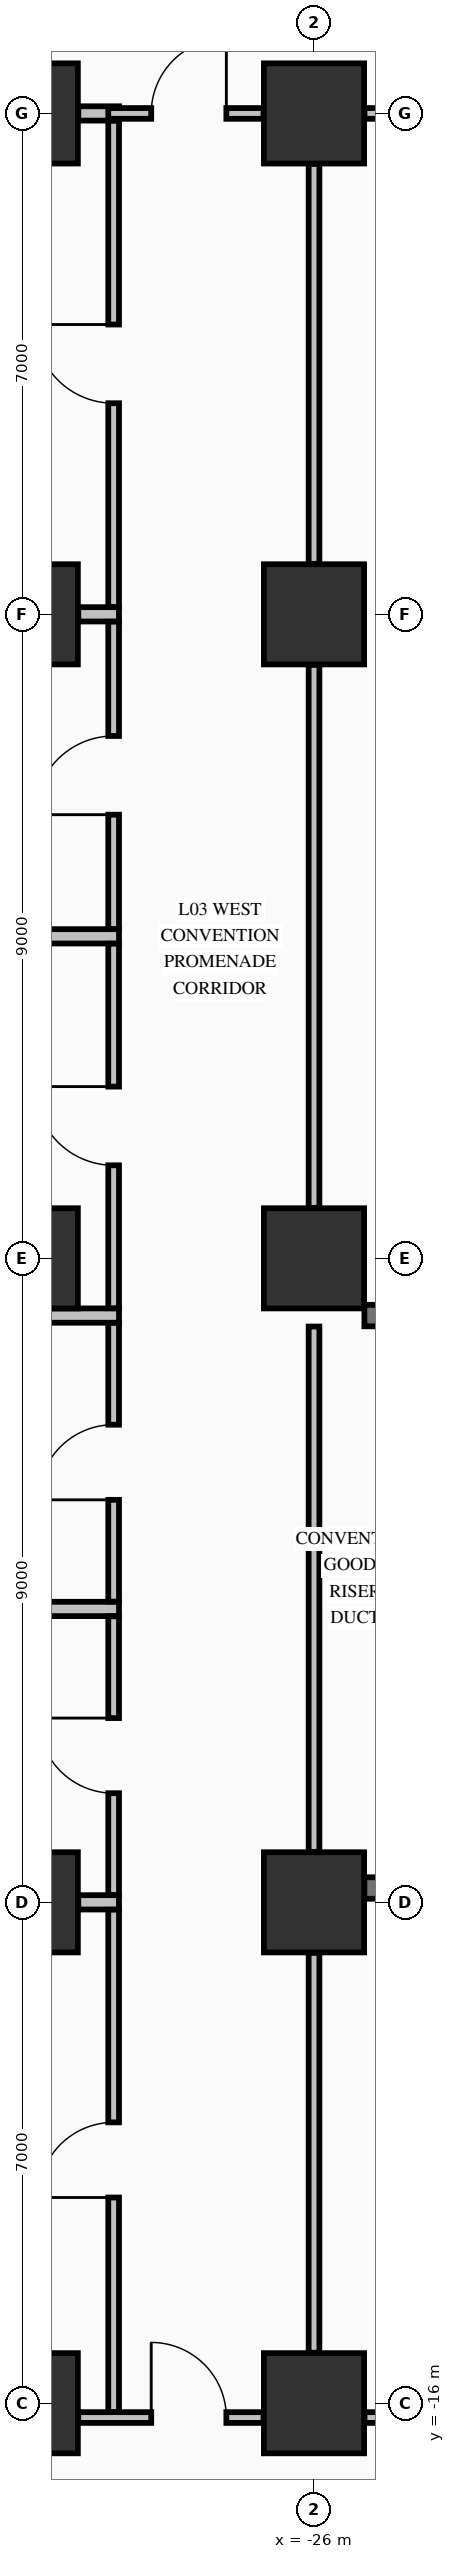
"""IFC4 building model, lengths in metres.
Left out: names, types, materials, properties, quantities, classifications, styles, units other than length and angle.
Written with IfcOpenShell. Run it as: python <this file> out.ifc"""

import sys

from ifc_helpers import new_model, si_unit, direction, frame, frame_2d, origin, origin_2d, place, context, subcontext, project, spatial, rectangle, extrude, element, fill, save


model = new_model("IFC4")
c1 = context("Model", 3, precision=1e-05, world=origin(), true_north=direction((0.0, 1.0)))
c2 = subcontext(c1, "Body", "Model", "MODEL_VIEW")
j1 = project(units=[si_unit("LENGTHUNIT", "METRE"), si_unit("PLANEANGLEUNIT", "RADIAN")], contexts=[c1])
p1 = place(None, origin())
s1 = spatial("IfcSite", under=j1, at=p1, CompositionType="ELEMENT")
p2 = place(p1, origin())
s2 = spatial("IfcBuilding", under=s1, at=p2, CompositionType="ELEMENT")
p3 = place(p2, frame((0.0, 0.0, 16.32)))
s3 = spatial("IfcBuildingStorey", under=s2, at=p3, CompositionType="ELEMENT", Elevation=16.32)
for number, where, z_axis, x_axis in (
    (1, (-30.0, -16.0, 0.0), (0.0, 0.0, 1.0), (1.0, 0.0, 0.0)),
    (2, (-30.0, -9.0, 0.0), (0.0, 0.0, 1.0), (1.0, 0.0, 0.0)),
    (3, (-30.0, 0.0, 0.0), (0.0, 0.0, 1.0), (1.0, 0.0, 0.0)),
    (4, (-30.0, 9.0, 0.0), (0.0, 0.0, 1.0), (1.0, 0.0, 0.0)),
    (5, (-30.0, 16.0, 0.0), (0.0, 0.0, 1.0), (1.0, 0.0, 0.0)),
    (6, (-26.0, -16.0, 0.0), (0.0, 0.0, 1.0), (1.0, 0.0, 0.0)),
    (7, (-26.0, -9.0, 0.0), (0.0, 0.0, 1.0), (1.0, 0.0, 0.0)),
    (8, (-26.0, 0.0, 0.0), (0.0, 0.0, 1.0), (1.0, 0.0, 0.0)),
    (9, (-26.0, 9.0, 0.0), (0.0, 0.0, 1.0), (1.0, 0.0, 0.0)),
    (10, (-26.0, 16.0, 0.0), (0.0, 0.0, 1.0), (1.0, 0.0, 0.0)),
):
    element("IfcColumn", number, at=place(p3, frame(where, z_axis=z_axis, x_axis=x_axis)), inside=s3, PredefinedType="COLUMN", context=c2, shape_type="SweptSolid", body=[
        extrude(rectangle(XDim=1.4, YDim=1.4, at=origin_2d()), origin(), (0.0, 0.0, 1.0), 4.99),
    ])
for number, where, z_axis, x_axis in (
    (11, (-25.296, -8.8, 0.0), (0.0, 0.0, 1.0), (1.0, 0.0, 0.0)),
    (12, (-25.296, -0.8, 0.0), (0.0, 0.0, 1.0), (1.0, 0.0, 0.0)),
):
    element("IfcWall", number, at=place(p3, frame(where, z_axis=z_axis, x_axis=x_axis)), inside=s3, PredefinedType="SHEAR", context=c2, shape_type="SweptSolid", body=[
        extrude(rectangle(XDim=3.046, YDim=0.3, at=frame_2d((1.523, 0.0))), origin(), (0.0, 0.0, 1.0), 4.99),
    ])
p4 = place(p3, frame((-29.294, -16.2, 0.0), z_axis=(0.0, 0.0, 1.0), x_axis=(1.0, 0.0, 0.0)))
e13 = element("IfcWall", 13, at=p4, inside=s3, PredefinedType="PARTITIONING", context=c2, shape_type="SweptSolid", body=[
    extrude(rectangle(XDim=2.588, YDim=0.15, at=frame_2d((1.294, 0.0))), origin(), (0.0, 0.0, 1.0), 3.332),
])
p5 = place(p4, frame((1.019, 0.0, 0.0)))
e14 = element("IfcOpeningElement", 14, at=p5, cuts=e13, PredefinedType="OPENING", context=c2, shape_type="SweptSolid", body=[
    extrude(rectangle(XDim=1.05, YDim=2.15, at=frame_2d((0.525, 1.075))), frame((0.0, 0.085, 0.0), z_axis=(0.0, -1.0, 0.0), x_axis=(1.0, 0.0, 0.0)), (0.0, 0.0, 1.0), 0.17),
])
p6 = place(p3, frame((-25.294, -16.2, 0.0), z_axis=(0.0, 0.0, 1.0), x_axis=(1.0, 0.0, 0.0)))
e15 = element("IfcWall", 15, at=p6, inside=s3, PredefinedType="PARTITIONING", context=c2, shape_type="SweptSolid", body=[
    extrude(rectangle(XDim=4.488, YDim=0.15, at=frame_2d((2.244, 0.0))), origin(), (0.0, 0.0, 1.0), 3.332),
])
p7 = place(p6, frame((0.619, 0.0, 0.0)))
e16 = element("IfcOpeningElement", 16, at=p7, cuts=e15, PredefinedType="OPENING", context=c2, shape_type="SweptSolid", body=[
    extrude(rectangle(XDim=0.95, YDim=2.15, at=frame_2d((0.475, 1.075))), frame((0.0, 0.085, 0.0), z_axis=(0.0, -1.0, 0.0), x_axis=(1.0, 0.0, 0.0)), (0.0, 0.0, 1.0), 0.17),
])
p8 = place(p3, frame((-29.294, -9.0, 0.0), z_axis=(0.0, 0.0, 1.0), x_axis=(1.0, 0.0, 0.0)))
e17 = element("IfcWall", 17, at=p8, inside=s3, PredefinedType="PARTITIONING", context=c2, shape_type="SweptSolid", body=[
    extrude(rectangle(XDim=0.569, YDim=0.2, at=frame_2d((0.284, 0.0))), origin(), (0.0, 0.0, 1.0), 3.332),
])
for number, where, z_axis, x_axis in (
    (18, (-33.835, -4.9, 0.0), (0.0, 0.0, 1.0), (1.0, 0.0, 0.0)),
    (19, (-33.835, -0.8, 0.0), (0.0, 0.0, 1.0), (1.0, 0.0, 0.0)),
):
    element("IfcWall", number, at=place(p3, frame(where, z_axis=z_axis, x_axis=x_axis)), inside=s3, PredefinedType="PARTITIONING", context=c2, shape_type="SweptSolid", body=[
        extrude(rectangle(XDim=5.11, YDim=0.2, at=frame_2d((2.555, 0.0))), origin(), (0.0, 0.0, 1.0), 4.99),
    ])
p9 = place(p3, frame((-33.835, 4.5, 0.0), z_axis=(0.0, 0.0, 1.0), x_axis=(1.0, 0.0, 0.0)))
e20 = element("IfcWall", 20, at=p9, inside=s3, PredefinedType="PARTITIONING", context=c2, shape_type="SweptSolid", body=[
    extrude(rectangle(XDim=5.11, YDim=0.2, at=frame_2d((2.555, 0.0))), origin(), (0.0, 0.0, 1.0), 4.38),
])
for number, where, z_axis, x_axis in (
    (21, (-29.294, 9.0, 0.0), (0.0, 0.0, 1.0), (1.0, 0.0, 0.0)),
    (22, (-29.294, 16.0, 0.0), (0.0, 0.0, 1.0), (1.0, 0.0, 0.0)),
):
    element("IfcWall", number, at=place(p3, frame(where, z_axis=z_axis, x_axis=x_axis)), inside=s3, PredefinedType="PARTITIONING", context=c2, shape_type="SweptSolid", body=[
        extrude(rectangle(XDim=0.569, YDim=0.2, at=frame_2d((0.284, 0.0))), origin(), (0.0, 0.0, 1.0), 3.332),
    ])
p10 = place(p3, frame((-28.875, 16.0, 0.0), z_axis=(0.0, 0.0, 1.0), x_axis=(1.0, 0.0, 0.0)))
e23 = element("IfcWall", 23, at=p10, inside=s3, PredefinedType="PARTITIONING", context=c2, shape_type="SweptSolid", body=[
    extrude(rectangle(XDim=2.169, YDim=0.15, at=frame_2d((1.084, 0.0))), origin(), (0.0, 0.0, 1.0), 3.332),
])
p11 = place(p10, frame((0.6, 0.0, 0.0)))
e24 = element("IfcOpeningElement", 24, at=p11, cuts=e23, PredefinedType="OPENING", context=c2, shape_type="SweptSolid", body=[
    extrude(rectangle(XDim=1.05, YDim=2.15, at=frame_2d((0.525, 1.075))), frame((0.0, 0.085, 0.0), z_axis=(0.0, -1.0, 0.0), x_axis=(1.0, 0.0, 0.0)), (0.0, 0.0, 1.0), 0.17),
])
p12 = place(p3, frame((-25.294, 16.0, 0.0), z_axis=(0.0, 0.0, 1.0), x_axis=(1.0, 0.0, 0.0)))
e25 = element("IfcWall", 25, at=p12, inside=s3, PredefinedType="PARTITIONING", context=c2, shape_type="SweptSolid", body=[
    extrude(rectangle(XDim=4.488, YDim=0.15, at=frame_2d((2.244, 0.0))), origin(), (0.0, 0.0, 1.0), 3.332),
])
p13 = place(p12, frame((3.238, 0.0, 0.0)))
e26 = element("IfcOpeningElement", 26, at=p13, cuts=e25, PredefinedType="OPENING", context=c2, shape_type="SweptSolid", body=[
    extrude(rectangle(XDim=1.1, YDim=2.15, at=frame_2d((0.55, 1.075))), frame((0.0, 0.085, 0.0), z_axis=(0.0, -1.0, 0.0), x_axis=(1.0, 0.0, 0.0)), (0.0, 0.0, 1.0), 0.17),
])
p14 = place(p3, frame((-28.8, -16.122, 0.0), z_axis=(0.0, 0.0, 1.0), x_axis=(0.0, 1.0, 0.0)))
e27 = element("IfcWall", 27, at=p14, inside=s3, PredefinedType="PARTITIONING", context=c2, shape_type="SweptSolid", body=[
    extrude(rectangle(XDim=7.019, YDim=0.15, at=frame_2d((3.51, 0.0))), origin(), (0.0, 0.0, 1.0), 4.99),
])
p15 = place(p14, frame((2.997, 0.0, 0.0)))
e28 = element("IfcOpeningElement", 28, at=p15, cuts=e27, PredefinedType="OPENING", context=c2, shape_type="SweptSolid", body=[
    extrude(rectangle(XDim=1.05, YDim=2.15, at=frame_2d((0.525, 1.075))), frame((0.0, 0.085, 0.0), z_axis=(0.0, -1.0, 0.0), x_axis=(1.0, 0.0, 0.0)), (0.0, 0.0, 1.0), 0.17),
])
p16 = place(p3, frame((-28.8, -8.897, 0.0), z_axis=(0.0, 0.0, 1.0), x_axis=(0.0, 1.0, 0.0)))
e29 = element("IfcWall", 29, at=p16, inside=s3, PredefinedType="PARTITIONING", context=c2, shape_type="SweptSolid", body=[
    extrude(rectangle(XDim=3.894, YDim=0.15, at=frame_2d((1.947, 0.0))), origin(), (0.0, 0.0, 1.0), 4.99),
])
p17 = place(p16, frame((1.422, 0.0, 0.0)))
e30 = element("IfcOpeningElement", 30, at=p17, cuts=e29, PredefinedType="OPENING", context=c2, shape_type="SweptSolid", body=[
    extrude(rectangle(XDim=1.05, YDim=2.15, at=frame_2d((0.525, 1.075))), frame((0.0, 0.085, 0.0), z_axis=(0.0, -1.0, 0.0), x_axis=(1.0, 0.0, 0.0)), (0.0, 0.0, 1.0), 0.17),
])
p18 = place(p3, frame((-28.8, -4.797, 0.0), z_axis=(0.0, 0.0, 1.0), x_axis=(0.0, 1.0, 0.0)))
e31 = element("IfcWall", 31, at=p18, inside=s3, PredefinedType="PARTITIONING", context=c2, shape_type="SweptSolid", body=[
    extrude(rectangle(XDim=3.894, YDim=0.15, at=frame_2d((1.947, 0.0))), origin(), (0.0, 0.0, 1.0), 4.99),
])
p19 = place(p18, frame((1.422, 0.0, 0.0)))
e32 = element("IfcOpeningElement", 32, at=p19, cuts=e31, PredefinedType="OPENING", context=c2, shape_type="SweptSolid", body=[
    extrude(rectangle(XDim=1.05, YDim=2.15, at=frame_2d((0.525, 1.075))), frame((0.0, 0.085, 0.0), z_axis=(0.0, -1.0, 0.0), x_axis=(1.0, 0.0, 0.0)), (0.0, 0.0, 1.0), 0.17),
])
p20 = place(p3, frame((-28.8, -0.697, 0.0), z_axis=(0.0, 0.0, 1.0), x_axis=(0.0, 1.0, 0.0)))
e33 = element("IfcWall", 33, at=p20, inside=s3, PredefinedType="PARTITIONING", context=c2, shape_type="SweptSolid", body=[
    extrude(rectangle(XDim=5.094, YDim=0.15, at=frame_2d((2.547, 0.0))), origin(), (0.0, 0.0, 1.0), 4.99),
])
p21 = place(p20, frame((1.997, 0.0, 0.0)))
e34 = element("IfcOpeningElement", 34, at=p21, cuts=e33, PredefinedType="OPENING", context=c2, shape_type="SweptSolid", body=[
    extrude(rectangle(XDim=1.1, YDim=2.15, at=frame_2d((0.55, 1.075))), frame((0.0, 0.085, 0.0), z_axis=(0.0, -1.0, 0.0), x_axis=(1.0, 0.0, 0.0)), (0.0, 0.0, 1.0), 0.17),
])
p22 = place(p3, frame((-28.8, 4.603, 0.0), z_axis=(0.0, 0.0, 1.0), x_axis=(0.0, 1.0, 0.0)))
e35 = element("IfcWall", 35, at=p22, inside=s3, PredefinedType="PARTITIONING", context=c2, shape_type="SweptSolid", body=[
    extrude(rectangle(XDim=4.294, YDim=0.15, at=frame_2d((2.147, 0.0))), origin(), (0.0, 0.0, 1.0), 4.99),
])
p23 = place(p22, frame((1.597, 0.0, 0.0)))
e36 = element("IfcOpeningElement", 36, at=p23, cuts=e35, PredefinedType="OPENING", context=c2, shape_type="SweptSolid", body=[
    extrude(rectangle(XDim=1.1, YDim=2.15, at=frame_2d((0.55, 1.075))), frame((0.0, 0.085, 0.0), z_axis=(0.0, -1.0, 0.0), x_axis=(1.0, 0.0, 0.0)), (0.0, 0.0, 1.0), 0.17),
])
p24 = place(p3, frame((-28.8, 9.103, 0.0), z_axis=(0.0, 0.0, 1.0), x_axis=(0.0, 1.0, 0.0)))
e37 = element("IfcWall", 37, at=p24, inside=s3, PredefinedType="PARTITIONING", context=c2, shape_type="SweptSolid", body=[
    extrude(rectangle(XDim=6.794, YDim=0.15, at=frame_2d((3.397, 0.0))), origin(), (0.0, 0.0, 1.0), 4.99),
])
p25 = place(p24, frame((2.847, 0.0, 0.0)))
e38 = element("IfcOpeningElement", 38, at=p25, cuts=e37, PredefinedType="OPENING", context=c2, shape_type="SweptSolid", body=[
    extrude(rectangle(XDim=1.1, YDim=2.15, at=frame_2d((0.55, 1.075))), frame((0.0, 0.085, 0.0), z_axis=(0.0, -1.0, 0.0), x_axis=(1.0, 0.0, 0.0)), (0.0, 0.0, 1.0), 0.17),
])
p26 = place(p3, frame((-26.0, -15.294, 0.0), z_axis=(0.0, 0.0, 1.0), x_axis=(0.0, 1.0, 0.0)))
e39 = element("IfcWall", 39, at=p26, inside=s3, PredefinedType="PARTITIONING", context=c2, shape_type="SweptSolid", body=[
    extrude(rectangle(XDim=5.588, YDim=0.15, at=frame_2d((2.794, 0.0))), origin(), (0.0, 0.0, 1.0), 3.332),
])
p27 = place(p3, frame((-26.0, -8.294, 0.0), z_axis=(0.0, 0.0, 1.0), x_axis=(0.0, 1.0, 0.0)))
e40 = element("IfcWall", 40, at=p27, inside=s3, PredefinedType="PARTITIONING", context=c2, shape_type="SweptSolid", body=[
    extrude(rectangle(XDim=7.341, YDim=0.15, at=frame_2d((3.67, 0.0))), origin(), (0.0, 0.0, 1.0), 3.332),
])
p28 = place(p3, frame((-26.0, 0.706, 0.0), z_axis=(0.0, 0.0, 1.0), x_axis=(0.0, 1.0, 0.0)))
e41 = element("IfcWall", 41, at=p28, inside=s3, PredefinedType="PARTITIONING", context=c2, shape_type="SweptSolid", body=[
    extrude(rectangle(XDim=7.588, YDim=0.15, at=frame_2d((3.794, 0.0))), origin(), (0.0, 0.0, 1.0), 3.332),
])
p29 = place(p3, frame((-26.0, 9.706, 0.0), z_axis=(0.0, 0.0, 1.0), x_axis=(0.0, 1.0, 0.0)))
e42 = element("IfcWall", 42, at=p29, inside=s3, PredefinedType="PARTITIONING", context=c2, shape_type="SweptSolid", body=[
    extrude(rectangle(XDim=5.588, YDim=0.15, at=frame_2d((2.794, 0.0))), origin(), (0.0, 0.0, 1.0), 3.332),
])
p30 = place(p5, origin())
e43 = element("IfcDoor", 43, at=p30, inside=s3, OperationType="SINGLE_SWING_LEFT", PredefinedType="DOOR", context=c2, shape_type="SweptSolid", body=[
    extrude(rectangle(XDim=1.05, YDim=2.15, at=frame_2d((0.525, 1.075))), frame((0.0, 0.025, 0.0), z_axis=(0.0, -1.0, 0.0), x_axis=(1.0, 0.0, 0.0)), (0.0, 0.0, 1.0), 0.05),
])
fill(e14, e43)
p31 = place(p11, origin())
e44 = element("IfcDoor", 44, at=p31, inside=s3, OperationType="SINGLE_SWING_RIGHT", PredefinedType="DOOR", context=c2, shape_type="SweptSolid", body=[
    extrude(rectangle(XDim=1.05, YDim=2.15, at=frame_2d((0.525, 1.075))), frame((0.0, 0.025, 0.0), z_axis=(0.0, -1.0, 0.0), x_axis=(1.0, 0.0, 0.0)), (0.0, 0.0, 1.0), 0.05),
])
fill(e24, e44)
p32 = place(p15, origin())
e45 = element("IfcDoor", 45, at=p32, inside=s3, OperationType="SINGLE_SWING_LEFT", PredefinedType="DOOR", context=c2, shape_type="SweptSolid", body=[
    extrude(rectangle(XDim=1.05, YDim=2.15, at=frame_2d((0.525, 1.075))), frame((0.0, 0.025, 0.0), z_axis=(0.0, -1.0, 0.0), x_axis=(1.0, 0.0, 0.0)), (0.0, 0.0, 1.0), 0.05),
])
fill(e28, e45)
p33 = place(p17, origin())
e46 = element("IfcDoor", 46, at=p33, inside=s3, OperationType="SINGLE_SWING_RIGHT", PredefinedType="DOOR", context=c2, shape_type="SweptSolid", body=[
    extrude(rectangle(XDim=1.05, YDim=2.15, at=frame_2d((0.525, 1.075))), frame((0.0, 0.025, 0.0), z_axis=(0.0, -1.0, 0.0), x_axis=(1.0, 0.0, 0.0)), (0.0, 0.0, 1.0), 0.05),
])
fill(e30, e46)
p34 = place(p19, origin())
e47 = element("IfcDoor", 47, at=p34, inside=s3, OperationType="SINGLE_SWING_LEFT", PredefinedType="DOOR", context=c2, shape_type="SweptSolid", body=[
    extrude(rectangle(XDim=1.05, YDim=2.15, at=frame_2d((0.525, 1.075))), frame((0.0, 0.025, 0.0), z_axis=(0.0, -1.0, 0.0), x_axis=(1.0, 0.0, 0.0)), (0.0, 0.0, 1.0), 0.05),
])
fill(e32, e47)
p35 = place(p21, origin())
e48 = element("IfcDoor", 48, at=p35, inside=s3, OperationType="SINGLE_SWING_RIGHT", PredefinedType="DOOR", context=c2, shape_type="SweptSolid", body=[
    extrude(rectangle(XDim=1.1, YDim=2.15, at=frame_2d((0.55, 1.075))), frame((0.0, 0.025, 0.0), z_axis=(0.0, -1.0, 0.0), x_axis=(1.0, 0.0, 0.0)), (0.0, 0.0, 1.0), 0.05),
])
fill(e34, e48)
p36 = place(p23, origin())
e49 = element("IfcDoor", 49, at=p36, inside=s3, OperationType="SINGLE_SWING_LEFT", PredefinedType="DOOR", context=c2, shape_type="SweptSolid", body=[
    extrude(rectangle(XDim=1.1, YDim=2.15, at=frame_2d((0.55, 1.075))), frame((0.0, 0.025, 0.0), z_axis=(0.0, -1.0, 0.0), x_axis=(1.0, 0.0, 0.0)), (0.0, 0.0, 1.0), 0.05),
])
fill(e36, e49)
p37 = place(p25, origin())
e50 = element("IfcDoor", 50, at=p37, inside=s3, OperationType="SINGLE_SWING_RIGHT", PredefinedType="DOOR", context=c2, shape_type="SweptSolid", body=[
    extrude(rectangle(XDim=1.1, YDim=2.15, at=frame_2d((0.55, 1.075))), frame((0.0, 0.025, 0.0), z_axis=(0.0, -1.0, 0.0), x_axis=(1.0, 0.0, 0.0)), (0.0, 0.0, 1.0), 0.05),
])
fill(e38, e50)
save(model, sys.argv[1])
